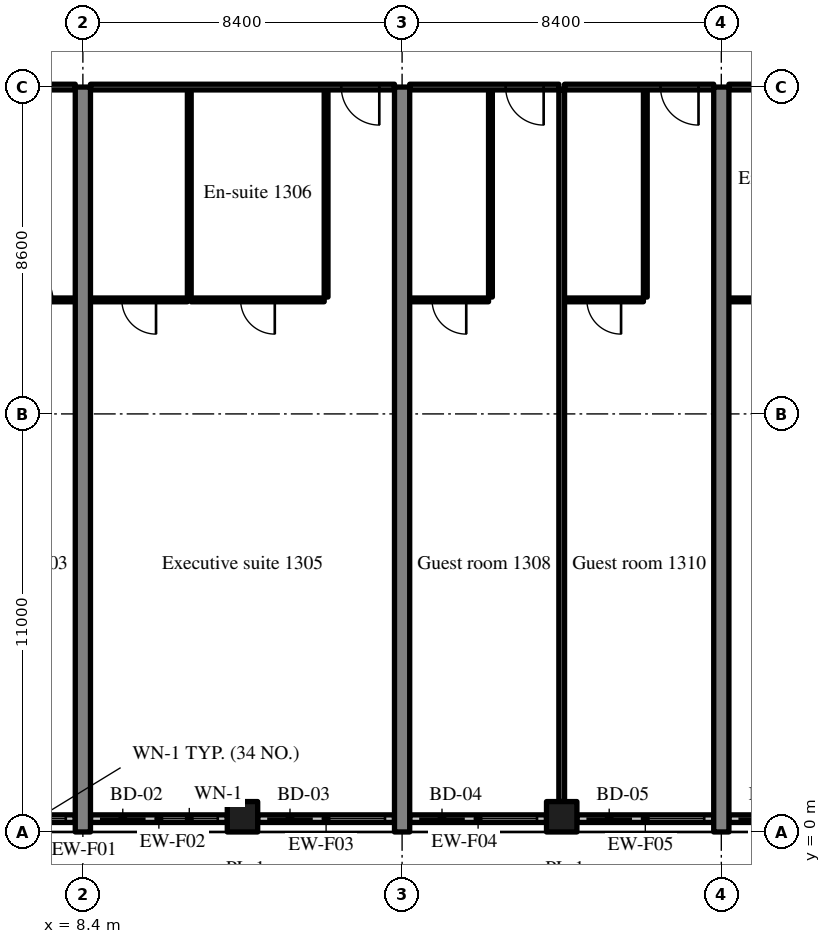
"""IFC4 building model, lengths in metres.
Left out: names, types, materials, properties, quantities, classifications, styles, units other than length and angle.
Written with IfcOpenShell. Run it as: python <this file> out.ifc"""

import sys

from ifc_helpers import new_model, si_unit, direction, frame, frame_2d, origin, origin_2d, place, context, subcontext, project, spatial, rectangle, extrude, source, transform, mapped, element, fill, save


model = new_model("IFC4")
c1 = context("Model", 3, precision=1e-05, world=origin(), true_north=direction((0.0, 1.0)))
c2 = subcontext(c1, "Body", "Model", "MODEL_VIEW")
j1 = project(units=[si_unit("LENGTHUNIT", "METRE"), si_unit("PLANEANGLEUNIT", "RADIAN")], contexts=[c1])
p1 = place(None, origin())
s1 = spatial("IfcSite", under=j1, at=p1, CompositionType="ELEMENT")
p2 = place(p1, origin())
s2 = spatial("IfcBuilding", under=s1, at=p2, CompositionType="ELEMENT")
p3 = place(p2, frame((0.0, 0.0, 58.2)))
s3 = spatial("IfcBuildingStorey", under=s2, at=p3, CompositionType="ELEMENT", Elevation=58.2)
m1 = source(origin(), c2, "Body", "SweptSolid", [
    extrude(rectangle(XDim=19.6, YDim=0.4, at=frame_2d((9.8, 0.0))), origin(), (0.0, 0.0, 1.0), 3.52),
])
for number, where, z_axis, x_axis in (
    (1, (8.4, 0.0, 0.0), (0.0, 0.0, 1.0), (0.0, 1.0, 0.0)),
    (2, (16.8, 0.0, 0.0), (0.0, 0.0, 1.0), (0.0, 1.0, 0.0)),
    (3, (25.2, 0.0, 0.0), (0.0, 0.0, 1.0), (0.0, 1.0, 0.0)),
):
    element("IfcWall", number, at=place(p3, frame(where, z_axis=z_axis, x_axis=x_axis)), inside=s3, PredefinedType="SHEAR", context=c2, shape_type="MappedRepresentation", body=[
        mapped(m1, transform((0.0, 0.0, 0.0), scale=1.0)),
    ])
m2 = source(origin(), c2, "Body", "SweptSolid", [
    extrude(rectangle(XDim=0.8, YDim=0.8, at=origin_2d()), origin(), (0.0, 0.0, 1.0), 3.52),
])
for number, where, z_axis, x_axis in (
    (4, (12.6, 0.4, 0.0), (0.0, 0.0, 1.0), (1.0, 0.0, 0.0)),
    (5, (21.0, 0.4, 0.0), (0.0, 0.0, 1.0), (1.0, 0.0, 0.0)),
):
    element("IfcColumn", number, at=place(p3, frame(where, z_axis=z_axis, x_axis=x_axis)), inside=s3, PredefinedType="COLUMN", context=c2, shape_type="MappedRepresentation", body=[
        mapped(m2, transform((0.0, 0.0, 0.0), scale=1.0)),
    ])
m3 = source(origin(), c2, "Body", "SweptSolid", [
    extrude(rectangle(XDim=4.055, YDim=0.2, at=frame_2d((2.027, 0.0))), origin(), (0.0, 0.0, 1.0), 2.82),
])
p4 = place(p3, frame((4.145, 0.35, 0.0), z_axis=(0.0, 0.0, 1.0), x_axis=(1.0, 0.0, 0.0)))
e6 = element("IfcWall", 6, at=p4, inside=s3, PredefinedType="SOLIDWALL", context=c2, shape_type="MappedRepresentation", body=[
    mapped(m3, transform((0.0, 0.0, 0.0), scale=1.0)),
])
m4 = source(origin(), c2, "Body", "SweptSolid", [
    extrude(rectangle(XDim=1.2, YDim=2.4, at=frame_2d((0.6, 1.2))), frame((0.0, 0.11, 0.0), z_axis=(0.0, -1.0, 0.0), x_axis=(1.0, 0.0, 0.0)), (0.0, 0.0, 1.0), 0.22),
])
p5 = place(p4, frame((0.25, 0.0, 0.0)))
e7 = element("IfcOpeningElement", 7, at=p5, cuts=e6, PredefinedType="OPENING", context=c2, shape_type="MappedRepresentation", body=[
    mapped(m4, transform((0.0, 0.0, 0.0), scale=1.0)),
])
m5 = source(origin(), c2, "Body", "SweptSolid", [
    extrude(rectangle(XDim=1.5, YDim=1.5, at=frame_2d((0.75, 0.75))), frame((0.0, 0.11, 0.0), z_axis=(0.0, -1.0, 0.0), x_axis=(1.0, 0.0, 0.0)), (0.0, 0.0, 1.0), 0.22),
])
p6 = place(p4, frame((2.305, 0.0, 0.9)))
e8 = element("IfcOpeningElement", 8, at=p6, cuts=e6, PredefinedType="OPENING", context=c2, shape_type="MappedRepresentation", body=[
    mapped(m5, transform((0.0, 0.0, 0.0), scale=1.0)),
])
m6 = source(origin(), c2, "Body", "SweptSolid", [
    extrude(rectangle(XDim=3.6, YDim=0.2, at=frame_2d((1.8, 0.0))), origin(), (0.0, 0.0, 1.0), 2.82),
])
p7 = place(p3, frame((8.6, 0.35, 0.0), z_axis=(0.0, 0.0, 1.0), x_axis=(1.0, 0.0, 0.0)))
e9 = element("IfcWall", 9, at=p7, inside=s3, PredefinedType="SOLIDWALL", context=c2, shape_type="MappedRepresentation", body=[
    mapped(m6, transform((0.0, 0.0, 0.0), scale=1.0)),
])
p8 = place(p7, frame((0.25, 0.0, 0.0)))
e10 = element("IfcOpeningElement", 10, at=p8, cuts=e9, PredefinedType="OPENING", context=c2, shape_type="MappedRepresentation", body=[
    mapped(m4, transform((0.0, 0.0, 0.0), scale=1.0)),
])
p9 = place(p7, frame((1.85, 0.0, 0.9)))
e11 = element("IfcOpeningElement", 11, at=p9, cuts=e9, PredefinedType="OPENING", context=c2, shape_type="MappedRepresentation", body=[
    mapped(m5, transform((0.0, 0.0, 0.0), scale=1.0)),
])
m7 = source(origin(), c2, "Body", "SweptSolid", [
    extrude(rectangle(XDim=3.6, YDim=0.2, at=frame_2d((1.8, 0.0))), origin(), (0.0, 0.0, 1.0), 2.82),
])
p10 = place(p3, frame((13.0, 0.35, 0.0), z_axis=(0.0, 0.0, 1.0), x_axis=(1.0, 0.0, 0.0)))
e12 = element("IfcWall", 12, at=p10, inside=s3, PredefinedType="SOLIDWALL", context=c2, shape_type="MappedRepresentation", body=[
    mapped(m7, transform((0.0, 0.0, 0.0), scale=1.0)),
])
p11 = place(p10, frame((0.25, 0.0, 0.0)))
e13 = element("IfcOpeningElement", 13, at=p11, cuts=e12, PredefinedType="OPENING", context=c2, shape_type="MappedRepresentation", body=[
    mapped(m4, transform((0.0, 0.0, 0.0), scale=1.0)),
])
p12 = place(p10, frame((1.85, 0.0, 0.9)))
e14 = element("IfcOpeningElement", 14, at=p12, cuts=e12, PredefinedType="OPENING", context=c2, shape_type="MappedRepresentation", body=[
    mapped(m5, transform((0.0, 0.0, 0.0), scale=1.0)),
])
p13 = place(p3, frame((17.0, 0.35, 0.0), z_axis=(0.0, 0.0, 1.0), x_axis=(1.0, 0.0, 0.0)))
e15 = element("IfcWall", 15, at=p13, inside=s3, PredefinedType="SOLIDWALL", context=c2, shape_type="MappedRepresentation", body=[
    mapped(m7, transform((0.0, 0.0, 0.0), scale=1.0)),
])
p14 = place(p13, frame((0.25, 0.0, 0.0)))
e16 = element("IfcOpeningElement", 16, at=p14, cuts=e15, PredefinedType="OPENING", context=c2, shape_type="MappedRepresentation", body=[
    mapped(m4, transform((0.0, 0.0, 0.0), scale=1.0)),
])
p15 = place(p13, frame((1.85, 0.0, 0.9)))
e17 = element("IfcOpeningElement", 17, at=p15, cuts=e15, PredefinedType="OPENING", context=c2, shape_type="MappedRepresentation", body=[
    mapped(m5, transform((0.0, 0.0, 0.0), scale=1.0)),
])
p16 = place(p3, frame((21.4, 0.35, 0.0), z_axis=(0.0, 0.0, 1.0), x_axis=(1.0, 0.0, 0.0)))
e18 = element("IfcWall", 18, at=p16, inside=s3, PredefinedType="SOLIDWALL", context=c2, shape_type="MappedRepresentation", body=[
    mapped(m7, transform((0.0, 0.0, 0.0), scale=1.0)),
])
p17 = place(p16, frame((0.25, 0.0, 0.0)))
e19 = element("IfcOpeningElement", 19, at=p17, cuts=e18, PredefinedType="OPENING", context=c2, shape_type="MappedRepresentation", body=[
    mapped(m4, transform((0.0, 0.0, 0.0), scale=1.0)),
])
p18 = place(p16, frame((1.85, 0.0, 0.9)))
e20 = element("IfcOpeningElement", 20, at=p18, cuts=e18, PredefinedType="OPENING", context=c2, shape_type="MappedRepresentation", body=[
    mapped(m5, transform((0.0, 0.0, 0.0), scale=1.0)),
])
p19 = place(p3, frame((25.4, 0.35, 0.0), z_axis=(0.0, 0.0, 1.0), x_axis=(1.0, 0.0, 0.0)))
e21 = element("IfcWall", 21, at=p19, inside=s3, PredefinedType="SOLIDWALL", context=c2, shape_type="MappedRepresentation", body=[
    mapped(m7, transform((0.0, 0.0, 0.0), scale=1.0)),
])
p20 = place(p19, frame((0.25, 0.0, 0.0)))
e22 = element("IfcOpeningElement", 22, at=p20, cuts=e21, PredefinedType="OPENING", context=c2, shape_type="MappedRepresentation", body=[
    mapped(m4, transform((0.0, 0.0, 0.0), scale=1.0)),
])
p21 = place(p19, frame((1.85, 0.0, 0.9)))
e23 = element("IfcOpeningElement", 23, at=p21, cuts=e21, PredefinedType="OPENING", context=c2, shape_type="MappedRepresentation", body=[
    mapped(m5, transform((0.0, 0.0, 0.0), scale=1.0)),
])
m8 = source(origin(), c2, "Body", "SweptSolid", [
    extrude(rectangle(XDim=2.075, YDim=0.1, at=frame_2d((1.038, 0.0))), origin(), (0.0, 0.0, 1.0), 3.52),
])
p22 = place(p3, frame((6.125, 14.0, 0.0), z_axis=(0.0, 0.0, 1.0), x_axis=(1.0, 0.0, 0.0)))
e24 = element("IfcWall", 24, at=p22, inside=s3, PredefinedType="PARTITIONING", context=c2, shape_type="MappedRepresentation", body=[
    mapped(m8, transform((0.0, 0.0, 0.0), scale=1.0)),
])
m9 = source(origin(), c2, "Body", "SweptSolid", [
    extrude(rectangle(XDim=0.9, YDim=2.1, at=frame_2d((0.45, 1.05))), frame((0.0, 0.06, 0.0), z_axis=(0.0, -1.0, 0.0), x_axis=(1.0, 0.0, 0.0)), (0.0, 0.0, 1.0), 0.12),
])
p23 = place(p22, frame((0.587, 0.0, 0.0)))
e25 = element("IfcOpeningElement", 25, at=p23, cuts=e24, PredefinedType="OPENING", context=c2, shape_type="MappedRepresentation", body=[
    mapped(m9, transform((0.0, 0.0, 0.0), scale=1.0)),
])
m10 = source(origin(), c2, "Body", "SweptSolid", [
    extrude(rectangle(XDim=3.925, YDim=0.15, at=frame_2d((1.962, 0.0))), origin(), (0.0, 0.0, 1.0), 2.82),
])
p24 = place(p3, frame((4.275, 19.6, 0.0), z_axis=(0.0, 0.0, 1.0), x_axis=(1.0, 0.0, 0.0)))
e26 = element("IfcWall", 26, at=p24, inside=s3, PredefinedType="PARTITIONING", context=c2, shape_type="MappedRepresentation", body=[
    mapped(m10, transform((0.0, 0.0, 0.0), scale=1.0)),
])
m11 = source(origin(), c2, "Body", "SweptSolid", [
    extrude(rectangle(XDim=1.0, YDim=2.1, at=frame_2d((0.5, 1.05))), frame((0.0, 0.085, 0.0), z_axis=(0.0, -1.0, 0.0), x_axis=(1.0, 0.0, 0.0)), (0.0, 0.0, 1.0), 0.17),
])
p25 = place(p24, frame((0.4, 0.0, 0.0)))
e27 = element("IfcOpeningElement", 27, at=p25, cuts=e26, PredefinedType="OPENING", context=c2, shape_type="MappedRepresentation", body=[
    mapped(m11, transform((0.0, 0.0, 0.0), scale=1.0)),
])
m12 = source(origin(), c2, "Body", "SweptSolid", [
    extrude(rectangle(XDim=5.45, YDim=0.1, at=frame_2d((2.725, 0.0))), origin(), (0.0, 0.0, 1.0), 3.52),
])
for number, where, z_axis, x_axis in (
    (28, (14.8, 14.075, 0.0), (0.0, 0.0, 1.0), (0.0, 1.0, 0.0)),
    (29, (11.2, 14.075, 0.0), (0.0, 0.0, 1.0), (0.0, 1.0, 0.0)),
):
    element("IfcWall", number, at=place(p3, frame(where, z_axis=z_axis, x_axis=x_axis)), inside=s3, PredefinedType="PARTITIONING", context=c2, shape_type="MappedRepresentation", body=[
        mapped(m12, transform((0.0, 0.0, 0.0), scale=1.0)),
    ])
m13 = source(origin(), c2, "Body", "SweptSolid", [
    extrude(rectangle(XDim=3.5, YDim=0.1, at=frame_2d((1.75, 0.0))), origin(), (0.0, 0.0, 1.0), 3.52),
])
p26 = place(p3, frame((11.25, 14.0, 0.0), z_axis=(0.0, 0.0, 1.0), x_axis=(1.0, 0.0, 0.0)))
e30 = element("IfcWall", 30, at=p26, inside=s3, PredefinedType="PARTITIONING", context=c2, shape_type="MappedRepresentation", body=[
    mapped(m13, transform((0.0, 0.0, 0.0), scale=1.0)),
])
p27 = place(p26, frame((1.3, 0.0, 0.0)))
e31 = element("IfcOpeningElement", 31, at=p27, cuts=e30, PredefinedType="OPENING", context=c2, shape_type="MappedRepresentation", body=[
    mapped(m9, transform((0.0, 0.0, 0.0), scale=1.0)),
])
m14 = source(origin(), c2, "Body", "SweptSolid", [
    extrude(rectangle(XDim=2.55, YDim=0.1, at=frame_2d((1.275, 0.0))), origin(), (0.0, 0.0, 1.0), 3.52),
])
p28 = place(p3, frame((8.6, 14.0, 0.0), z_axis=(0.0, 0.0, 1.0), x_axis=(1.0, 0.0, 0.0)))
e32 = element("IfcWall", 32, at=p28, inside=s3, PredefinedType="PARTITIONING", context=c2, shape_type="MappedRepresentation", body=[
    mapped(m14, transform((0.0, 0.0, 0.0), scale=1.0)),
])
p29 = place(p28, frame((0.825, 0.0, 0.0)))
e33 = element("IfcOpeningElement", 33, at=p29, cuts=e32, PredefinedType="OPENING", context=c2, shape_type="MappedRepresentation", body=[
    mapped(m9, transform((0.0, 0.0, 0.0), scale=1.0)),
])
m15 = source(origin(), c2, "Body", "SweptSolid", [
    extrude(rectangle(XDim=8.0, YDim=0.15, at=frame_2d((4.0, 0.0))), origin(), (0.0, 0.0, 1.0), 2.82),
])
p30 = place(p3, frame((8.6, 19.6, 0.0), z_axis=(0.0, 0.0, 1.0), x_axis=(1.0, 0.0, 0.0)))
e34 = element("IfcWall", 34, at=p30, inside=s3, PredefinedType="PARTITIONING", context=c2, shape_type="MappedRepresentation", body=[
    mapped(m15, transform((0.0, 0.0, 0.0), scale=1.0)),
])
p31 = place(p30, frame((6.6, 0.0, 0.0)))
e35 = element("IfcOpeningElement", 35, at=p31, cuts=e34, PredefinedType="OPENING", context=c2, shape_type="MappedRepresentation", body=[
    mapped(m11, transform((0.0, 0.0, 0.0), scale=1.0)),
])
p32 = place(p3, frame((19.125, 14.075, 0.0), z_axis=(0.0, 0.0, 1.0), x_axis=(0.0, 1.0, 0.0)))
e36 = element("IfcWall", 36, at=p32, inside=s3, PredefinedType="PARTITIONING", context=c2, shape_type="MappedRepresentation", body=[
    mapped(m12, transform((0.0, 0.0, 0.0), scale=1.0)),
])
p33 = place(p3, frame((17.0, 14.0, 0.0), z_axis=(0.0, 0.0, 1.0), x_axis=(1.0, 0.0, 0.0)))
e37 = element("IfcWall", 37, at=p33, inside=s3, PredefinedType="PARTITIONING", context=c2, shape_type="MappedRepresentation", body=[
    mapped(m8, transform((0.0, 0.0, 0.0), scale=1.0)),
])
p34 = place(p33, frame((0.588, 0.0, 0.0)))
e38 = element("IfcOpeningElement", 38, at=p34, cuts=e37, PredefinedType="OPENING", context=c2, shape_type="MappedRepresentation", body=[
    mapped(m9, transform((0.0, 0.0, 0.0), scale=1.0)),
])
p35 = place(p3, frame((17.0, 19.6, 0.0), z_axis=(0.0, 0.0, 1.0), x_axis=(1.0, 0.0, 0.0)))
e39 = element("IfcWall", 39, at=p35, inside=s3, PredefinedType="PARTITIONING", context=c2, shape_type="MappedRepresentation", body=[
    mapped(m10, transform((0.0, 0.0, 0.0), scale=1.0)),
])
p36 = place(p35, frame((2.525, 0.0, 0.0)))
e40 = element("IfcOpeningElement", 40, at=p36, cuts=e39, PredefinedType="OPENING", context=c2, shape_type="MappedRepresentation", body=[
    mapped(m11, transform((0.0, 0.0, 0.0), scale=1.0)),
])
p37 = place(p3, frame((23.2, 14.075, 0.0), z_axis=(0.0, 0.0, 1.0), x_axis=(0.0, 1.0, 0.0)))
e41 = element("IfcWall", 41, at=p37, inside=s3, PredefinedType="PARTITIONING", context=c2, shape_type="MappedRepresentation", body=[
    mapped(m12, transform((0.0, 0.0, 0.0), scale=1.0)),
])
p38 = place(p3, frame((21.075, 14.0, 0.0), z_axis=(0.0, 0.0, 1.0), x_axis=(1.0, 0.0, 0.0)))
e42 = element("IfcWall", 42, at=p38, inside=s3, PredefinedType="PARTITIONING", context=c2, shape_type="MappedRepresentation", body=[
    mapped(m8, transform((0.0, 0.0, 0.0), scale=1.0)),
])
p39 = place(p38, frame((0.587, 0.0, 0.0)))
e43 = element("IfcOpeningElement", 43, at=p39, cuts=e42, PredefinedType="OPENING", context=c2, shape_type="MappedRepresentation", body=[
    mapped(m9, transform((0.0, 0.0, 0.0), scale=1.0)),
])
p40 = place(p3, frame((21.075, 19.6, 0.0), z_axis=(0.0, 0.0, 1.0), x_axis=(1.0, 0.0, 0.0)))
e44 = element("IfcWall", 44, at=p40, inside=s3, PredefinedType="PARTITIONING", context=c2, shape_type="MappedRepresentation", body=[
    mapped(m10, transform((0.0, 0.0, 0.0), scale=1.0)),
])
p41 = place(p40, frame((2.525, 0.0, 0.0)))
e45 = element("IfcOpeningElement", 45, at=p41, cuts=e44, PredefinedType="OPENING", context=c2, shape_type="MappedRepresentation", body=[
    mapped(m11, transform((0.0, 0.0, 0.0), scale=1.0)),
])
m16 = source(origin(), c2, "Body", "SweptSolid", [
    extrude(rectangle(XDim=18.725, YDim=0.15, at=frame_2d((9.362, 0.0))), origin(), (0.0, 0.0, 1.0), 3.52),
])
p42 = place(p3, frame((21.0, 0.8, 0.0), z_axis=(0.0, 0.0, 1.0), x_axis=(0.0, 1.0, 0.0)))
e46 = element("IfcWall", 46, at=p42, inside=s3, PredefinedType="PARTITIONING", context=c2, shape_type="MappedRepresentation", body=[
    mapped(m16, transform((0.0, 0.0, 0.0), scale=1.0)),
])
m17 = source(origin(), c2, "Body", "SweptSolid", [
    extrude(rectangle(XDim=2.55, YDim=0.1, at=frame_2d((1.275, 0.0))), origin(), (0.0, 0.0, 1.0), 3.52),
])
p43 = place(p3, frame((25.4, 14.0, 0.0), z_axis=(0.0, 0.0, 1.0), x_axis=(1.0, 0.0, 0.0)))
e47 = element("IfcWall", 47, at=p43, inside=s3, PredefinedType="PARTITIONING", context=c2, shape_type="MappedRepresentation", body=[
    mapped(m17, transform((0.0, 0.0, 0.0), scale=1.0)),
])
p44 = place(p43, frame((0.825, 0.0, 0.0)))
e48 = element("IfcOpeningElement", 48, at=p44, cuts=e47, PredefinedType="OPENING", context=c2, shape_type="MappedRepresentation", body=[
    mapped(m9, transform((0.0, 0.0, 0.0), scale=1.0)),
])
p45 = place(p3, frame((25.4, 19.6, 0.0), z_axis=(0.0, 0.0, 1.0), x_axis=(1.0, 0.0, 0.0)))
e49 = element("IfcWall", 49, at=p45, inside=s3, PredefinedType="PARTITIONING", context=c2, shape_type="MappedRepresentation", body=[
    mapped(m15, transform((0.0, 0.0, 0.0), scale=1.0)),
])
p46 = place(p45, frame((6.6, 0.0, 0.0)))
e50 = element("IfcOpeningElement", 50, at=p46, cuts=e49, PredefinedType="OPENING", context=c2, shape_type="MappedRepresentation", body=[
    mapped(m11, transform((0.0, 0.0, 0.0), scale=1.0)),
])
m18 = source(origin(), c2, "Body", "SweptSolid", [
    extrude(rectangle(XDim=1.5, YDim=1.5, at=frame_2d((0.75, 0.75))), frame((0.0, 0.03, 0.0), z_axis=(0.0, -1.0, 0.0), x_axis=(1.0, 0.0, 0.0)), (0.0, 0.0, 1.0), 0.06),
])
p47 = place(p6, origin())
e51 = element("IfcWindow", 51, at=p47, inside=s3, PartitioningType="SINGLE_PANEL", PredefinedType="WINDOW", context=c2, shape_type="MappedRepresentation", body=[
    mapped(m18, transform((0.0, 0.0, 0.0), scale=1.0)),
])
fill(e8, e51)
m19 = source(origin(), c2, "Body", "SweptSolid", [
    extrude(rectangle(XDim=1.2, YDim=2.4, at=frame_2d((0.6, 1.2))), frame((0.0, 0.025, 0.0), z_axis=(0.0, -1.0, 0.0), x_axis=(1.0, 0.0, 0.0)), (0.0, 0.0, 1.0), 0.05),
])
p48 = place(p8, origin())
e52 = element("IfcDoor", 52, at=p48, inside=s3, OperationType="SLIDING_TO_RIGHT", PredefinedType="DOOR", context=c2, shape_type="MappedRepresentation", body=[
    mapped(m19, transform((0.0, 0.0, 0.0), scale=1.0)),
])
fill(e10, e52)
p49 = place(p9, origin())
e53 = element("IfcWindow", 53, at=p49, inside=s3, PartitioningType="SINGLE_PANEL", PredefinedType="WINDOW", context=c2, shape_type="MappedRepresentation", body=[
    mapped(m18, transform((0.0, 0.0, 0.0), scale=1.0)),
])
fill(e11, e53)
p50 = place(p11, origin())
e54 = element("IfcDoor", 54, at=p50, inside=s3, OperationType="SLIDING_TO_LEFT", PredefinedType="DOOR", context=c2, shape_type="MappedRepresentation", body=[
    mapped(m19, transform((0.0, 0.0, 0.0), scale=1.0)),
])
fill(e13, e54)
p51 = place(p12, origin())
e55 = element("IfcWindow", 55, at=p51, inside=s3, PartitioningType="SINGLE_PANEL", PredefinedType="WINDOW", context=c2, shape_type="MappedRepresentation", body=[
    mapped(m18, transform((0.0, 0.0, 0.0), scale=1.0)),
])
fill(e14, e55)
p52 = place(p14, origin())
e56 = element("IfcDoor", 56, at=p52, inside=s3, OperationType="SLIDING_TO_RIGHT", PredefinedType="DOOR", context=c2, shape_type="MappedRepresentation", body=[
    mapped(m19, transform((0.0, 0.0, 0.0), scale=1.0)),
])
fill(e16, e56)
p53 = place(p15, origin())
e57 = element("IfcWindow", 57, at=p53, inside=s3, PartitioningType="SINGLE_PANEL", PredefinedType="WINDOW", context=c2, shape_type="MappedRepresentation", body=[
    mapped(m18, transform((0.0, 0.0, 0.0), scale=1.0)),
])
fill(e17, e57)
p54 = place(p17, origin())
e58 = element("IfcDoor", 58, at=p54, inside=s3, OperationType="SLIDING_TO_LEFT", PredefinedType="DOOR", context=c2, shape_type="MappedRepresentation", body=[
    mapped(m19, transform((0.0, 0.0, 0.0), scale=1.0)),
])
fill(e19, e58)
p55 = place(p18, origin())
e59 = element("IfcWindow", 59, at=p55, inside=s3, PartitioningType="SINGLE_PANEL", PredefinedType="WINDOW", context=c2, shape_type="MappedRepresentation", body=[
    mapped(m18, transform((0.0, 0.0, 0.0), scale=1.0)),
])
fill(e20, e59)
p56 = place(p20, origin())
e60 = element("IfcDoor", 60, at=p56, inside=s3, OperationType="SLIDING_TO_RIGHT", PredefinedType="DOOR", context=c2, shape_type="MappedRepresentation", body=[
    mapped(m19, transform((0.0, 0.0, 0.0), scale=1.0)),
])
fill(e22, e60)
m20 = source(origin(), c2, "Body", "SweptSolid", [
    extrude(rectangle(XDim=0.9, YDim=2.1, at=frame_2d((0.45, 1.05))), frame((0.0, 0.025, 0.0), z_axis=(0.0, -1.0, 0.0), x_axis=(1.0, 0.0, 0.0)), (0.0, 0.0, 1.0), 0.05),
])
p57 = place(p23, origin())
e61 = element("IfcDoor", 61, at=p57, inside=s3, OperationType="SINGLE_SWING_LEFT", PredefinedType="DOOR", context=c2, shape_type="MappedRepresentation", body=[
    mapped(m20, transform((0.0, 0.0, 0.0), scale=1.0)),
])
fill(e25, e61)
p58 = place(p27, origin())
e62 = element("IfcDoor", 62, at=p58, inside=s3, OperationType="SINGLE_SWING_RIGHT", PredefinedType="DOOR", context=c2, shape_type="MappedRepresentation", body=[
    mapped(m20, transform((0.0, 0.0, 0.0), scale=1.0)),
])
fill(e31, e62)
p59 = place(p29, origin())
e63 = element("IfcDoor", 63, at=p59, inside=s3, OperationType="SINGLE_SWING_RIGHT", PredefinedType="DOOR", context=c2, shape_type="MappedRepresentation", body=[
    mapped(m20, transform((0.0, 0.0, 0.0), scale=1.0)),
])
fill(e33, e63)
m21 = source(origin(), c2, "Body", "SweptSolid", [
    extrude(rectangle(XDim=1.0, YDim=2.1, at=frame_2d((0.5, 1.05))), frame((0.0, 0.025, 0.0), z_axis=(0.0, -1.0, 0.0), x_axis=(1.0, 0.0, 0.0)), (0.0, 0.0, 1.0), 0.05),
])
p60 = place(p31, origin())
e64 = element("IfcDoor", 64, at=p60, inside=s3, OperationType="SINGLE_SWING_RIGHT", PredefinedType="DOOR", context=c2, shape_type="MappedRepresentation", body=[
    mapped(m21, transform((0.0, 0.0, 0.0), scale=1.0)),
])
fill(e35, e64)
p61 = place(p34, origin())
e65 = element("IfcDoor", 65, at=p61, inside=s3, OperationType="SINGLE_SWING_RIGHT", PredefinedType="DOOR", context=c2, shape_type="MappedRepresentation", body=[
    mapped(m20, transform((0.0, 0.0, 0.0), scale=1.0)),
])
fill(e38, e65)
p62 = place(p36, origin())
e66 = element("IfcDoor", 66, at=p62, inside=s3, OperationType="SINGLE_SWING_RIGHT", PredefinedType="DOOR", context=c2, shape_type="MappedRepresentation", body=[
    mapped(m21, transform((0.0, 0.0, 0.0), scale=1.0)),
])
fill(e40, e66)
p63 = place(p39, origin())
e67 = element("IfcDoor", 67, at=p63, inside=s3, OperationType="SINGLE_SWING_RIGHT", PredefinedType="DOOR", context=c2, shape_type="MappedRepresentation", body=[
    mapped(m20, transform((0.0, 0.0, 0.0), scale=1.0)),
])
fill(e43, e67)
p64 = place(p41, origin())
e68 = element("IfcDoor", 68, at=p64, inside=s3, OperationType="SINGLE_SWING_RIGHT", PredefinedType="DOOR", context=c2, shape_type="MappedRepresentation", body=[
    mapped(m21, transform((0.0, 0.0, 0.0), scale=1.0)),
])
fill(e45, e68)
save(model, sys.argv[1])
